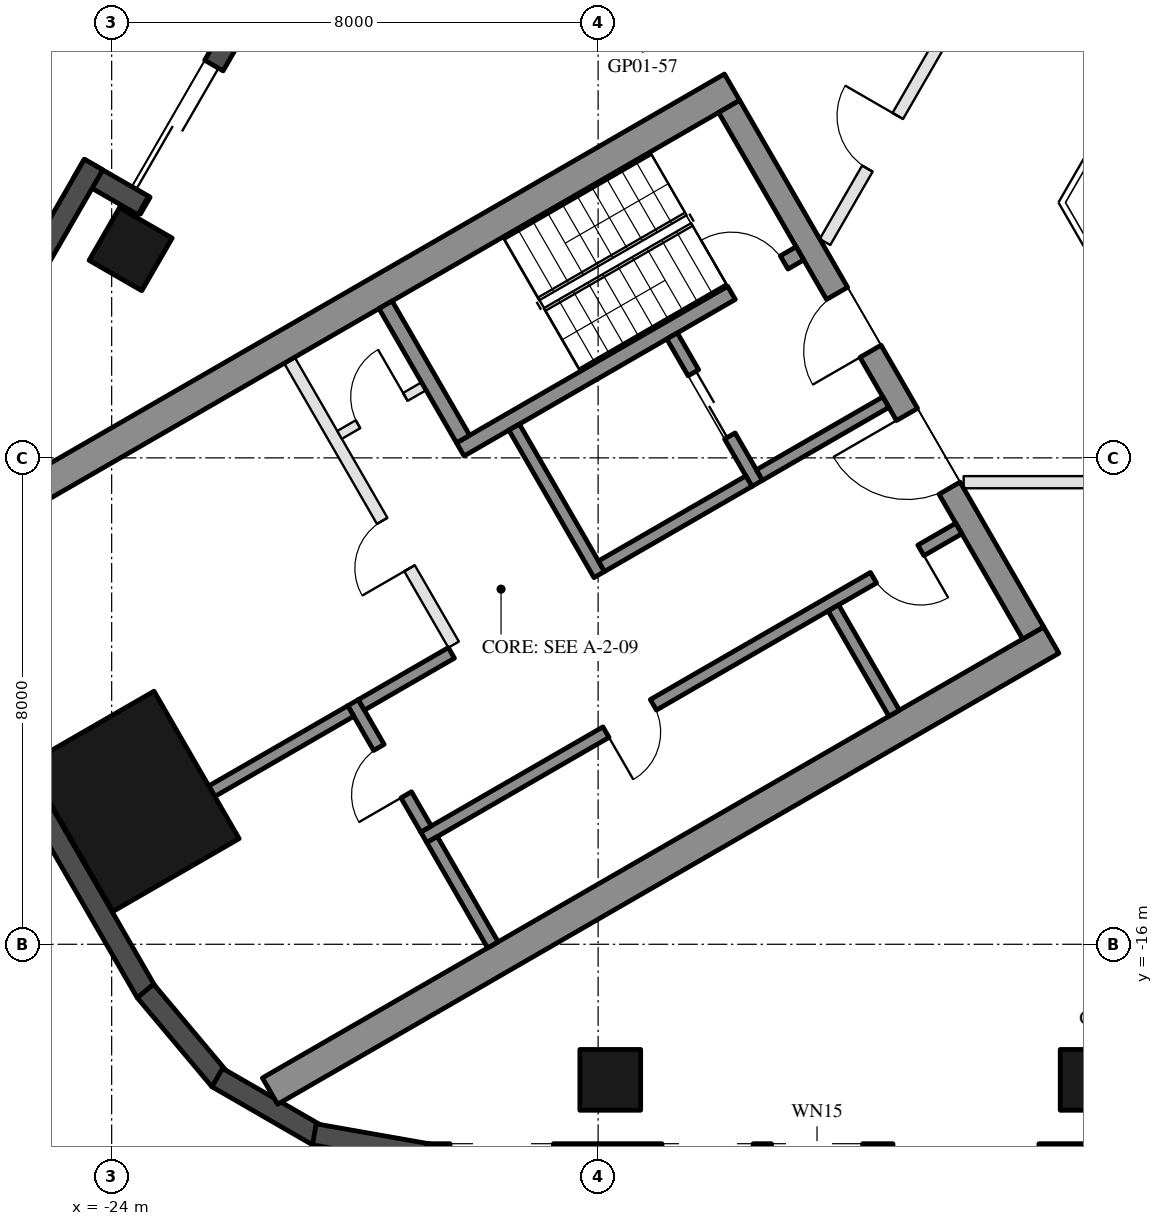
"""IFC4 building model, lengths in metres.
Left out: names, types, materials, properties, quantities, classifications, styles, units other than length and angle.
Written with IfcOpenShell. Run it as: python <this file> out.ifc"""

import sys

from ifc_helpers import new_model, si_unit, direction, frame, frame_2d, origin, origin_2d, place, context, subcontext, project, spatial, rectangle, hollow_rectangle, extrude, element, fill, save


model = new_model("IFC4")
c1 = context("Model", 3, precision=1e-05, world=origin(), true_north=direction((0.0, 1.0)))
c2 = subcontext(c1, "Body", "Model", "MODEL_VIEW")
j1 = project(units=[si_unit("LENGTHUNIT", "METRE"), si_unit("PLANEANGLEUNIT", "RADIAN")], contexts=[c1])
p1 = place(None, origin())
s1 = spatial("IfcSite", under=j1, at=p1, CompositionType="ELEMENT")
p2 = place(p1, origin())
s2 = spatial("IfcBuilding", under=s1, at=p2, CompositionType="ELEMENT")
p3 = place(p2, frame((0.0, 0.0, 46.5)))
s3 = spatial("IfcBuildingStorey", under=s2, at=p3, CompositionType="ELEMENT", Elevation=46.5)
for number, where, z_axis, x_axis in (
    (1, (-15.8, -18.23, 0.0), (0.0, 0.0, 1.0), (-1.0, 0.0, 0.0)),
    (2, (-7.9, -18.23, 0.0), (0.0, 0.0, 1.0), (-1.0, 0.0, 0.0)),
    (3, (-23.688, -4.568, 0.0), (0.0, 0.0, 1.0), (0.5, 0.866, 0.0)),
):
    element("IfcColumn", number, at=place(p3, frame(where, z_axis=z_axis, x_axis=x_axis)), inside=s3, PredefinedType="COLUMN", context=c2, shape_type="SweptSolid", body=[
        extrude(hollow_rectangle(XDim=1.0, YDim=1.0, WallThickness=0.045, at=origin_2d()), origin(), (0.0, 0.0, 1.0), 3.7),
    ])
p4 = place(p3, frame((-23.643, -13.65, 0.0), z_axis=(0.0, 0.0, 1.0), x_axis=(-0.5, 0.866025403784, 0.0)))
e4 = element("IfcColumn", 4, at=p4, inside=s3, PredefinedType="COLUMN", context=c2, shape_type="SweptSolid", body=[
    extrude(hollow_rectangle(XDim=2.8, YDim=2.4, WallThickness=0.07, at=origin_2d()), origin(), (0.0, 0.0, 1.0), 3.7),
])
p5 = place(p3, frame((-20.309, 1.934, 0.0), z_axis=(0.0, 0.0, 1.0), x_axis=(-0.499992114976, -0.866029956157, 0.0)))
e5 = element("IfcWall", 5, at=p5, inside=s3, PredefinedType="SOLIDWALL", context=c2, shape_type="SweptSolid", body=[
    extrude(rectangle(XDim=6.74, YDim=0.35, at=frame_2d((3.37, 0.0))), origin(), (0.0, 0.0, 1.0), 3.55),
])
p6 = place(p5, frame((4.02, 0.0, 0.0)))
e6 = element("IfcOpeningElement", 6, at=p6, cuts=e5, PredefinedType="OPENING", context=c2, shape_type="SweptSolid", body=[
    extrude(rectangle(XDim=2.4, YDim=2.4, at=frame_2d((1.2, 1.2))), frame((0.0, 0.185, 0.0), z_axis=(0.0, -1.0, 0.0), x_axis=(1.0, 0.0, 0.0)), (0.0, 0.0, 1.0), 0.37),
])
p7 = place(p5, frame((0.32, 0.0, 0.3)))
e7 = element("IfcOpeningElement", 7, at=p7, cuts=e5, PredefinedType="OPENING", context=c2, shape_type="SweptSolid", body=[
    extrude(rectangle(XDim=1.5, YDim=2.65, at=frame_2d((0.75, 1.325))), frame((0.0, 0.185, 0.0), z_axis=(0.0, -1.0, 0.0), x_axis=(1.0, 0.0, 0.0)), (0.0, 0.0, 1.0), 0.37),
])
p8 = place(p5, frame((2.12, 0.0, 0.3)))
e8 = element("IfcOpeningElement", 8, at=p8, cuts=e5, PredefinedType="OPENING", context=c2, shape_type="SweptSolid", body=[
    extrude(rectangle(XDim=1.5, YDim=2.65, at=frame_2d((0.75, 1.325))), frame((0.0, 0.185, 0.0), z_axis=(0.0, -1.0, 0.0), x_axis=(1.0, 0.0, 0.0)), (0.0, 0.0, 1.0), 0.37),
])
p9 = place(p3, frame((-23.481, -3.85, 0.0), z_axis=(0.0, 0.0, 1.0), x_axis=(-0.866092288191, 0.499884134912, 0.0)))
e9 = element("IfcWall", 9, at=p9, inside=s3, PredefinedType="SOLIDWALL", context=c2, shape_type="SweptSolid", body=[
    extrude(rectangle(XDim=1.22, YDim=0.35, at=frame_2d((0.61, 0.0))), origin(), (0.0, 0.0, 1.0), 3.55),
])
p10 = place(p3, frame((-24.299, -3.176, 0.0), z_axis=(0.0, 0.0, 1.0), x_axis=(-0.500028278809, -0.866009076391, 0.0)))
e10 = element("IfcWall", 10, at=p10, inside=s3, PredefinedType="SOLIDWALL", context=c2, shape_type="SweptSolid", body=[
    extrude(rectangle(XDim=3.916, YDim=0.35, at=frame_2d((1.958, 0.0))), origin(), (0.0, 0.0, 1.0), 3.55),
])
p11 = place(p10, frame((1.75, 0.0, 0.3)))
e11 = element("IfcOpeningElement", 11, at=p11, cuts=e10, PredefinedType="OPENING", context=c2, shape_type="SweptSolid", body=[
    extrude(rectangle(XDim=1.7, YDim=2.65, at=frame_2d((0.85, 1.325))), frame((0.0, 0.185, 0.0), z_axis=(0.0, -1.0, 0.0), x_axis=(1.0, 0.0, 0.0)), (0.0, 0.0, 1.0), 0.37),
])
p12 = place(p3, frame((-26.257, -11.893, 0.0), z_axis=(0.0, 0.0, 1.0), x_axis=(0.500018773155, -0.866014564827, 0.0)))
e12 = element("IfcWall", 12, at=p12, inside=s3, PredefinedType="SOLIDWALL", context=c2, shape_type="SweptSolid", body=[
    extrude(rectangle(XDim=5.658, YDim=0.35, at=frame_2d((2.829, 0.0))), origin(), (0.0, 0.0, 1.0), 3.55),
])
for number, where, z_axis, x_axis in (
    (13, (-23.445, -16.768, 0.0), (0.0, 0.0, 1.0), (0.643, -0.766, 0.0)),
    (14, (-22.264, -18.192, 0.0), (0.0, 0.0, 1.0), (0.866, -0.5, 0.0)),
):
    element("IfcWall", number, at=place(p3, frame(where, z_axis=z_axis, x_axis=x_axis)), inside=s3, PredefinedType="SOLIDWALL", context=c2, shape_type="SweptSolid", body=[
        extrude(rectangle(XDim=1.91, YDim=0.35, at=frame_2d((0.955, 0.0))), origin(), (0.0, 0.0, 1.0), 3.55),
    ])
p13 = place(p3, frame((-20.667, -19.126, 0.0), z_axis=(0.0, 0.0, 1.0), x_axis=(0.984798995425, -0.173697837091, 0.0)))
e15 = element("IfcWall", 15, at=p13, inside=s3, PredefinedType="SOLIDWALL", context=c2, shape_type="SweptSolid", body=[
    extrude(rectangle(XDim=1.91, YDim=0.35, at=frame_2d((0.955, 0.0))), origin(), (0.0, 0.0, 1.0), 3.55),
])
p14 = place(p3, frame((-18.816, -19.455, 0.0), z_axis=(0.0, 0.0, 1.0), x_axis=(1.0, 0.0, 0.0)))
e16 = element("IfcWall", 16, at=p14, inside=s3, PredefinedType="SOLIDWALL", context=c2, shape_type="SweptSolid", body=[
    extrude(rectangle(XDim=11.816, YDim=0.35, at=frame_2d((5.908, 0.0))), origin(), (0.0, 0.0, 1.0), 3.55),
])
p15 = place(p14, frame((0.381, 0.0, 0.3)))
e17 = element("IfcOpeningElement", 17, at=p15, cuts=e16, PredefinedType="OPENING", context=c2, shape_type="SweptSolid", body=[
    extrude(rectangle(XDim=1.7, YDim=2.65, at=frame_2d((0.85, 1.325))), frame((0.0, 0.185, 0.0), z_axis=(0.0, -1.0, 0.0), x_axis=(1.0, 0.0, 0.0)), (0.0, 0.0, 1.0), 0.37),
])
p16 = place(p14, frame((7.665, 0.0, 0.0)))
e18 = element("IfcOpeningElement", 18, at=p16, cuts=e16, PredefinedType="OPENING", context=c2, shape_type="SweptSolid", body=[
    extrude(rectangle(XDim=2.4, YDim=2.4, at=frame_2d((1.2, 1.2))), frame((0.0, 0.185, 0.0), z_axis=(0.0, -1.0, 0.0), x_axis=(1.0, 0.0, 0.0)), (0.0, 0.0, 1.0), 0.37),
])
p17 = place(p14, frame((3.866, 0.0, 0.3)))
e19 = element("IfcOpeningElement", 19, at=p17, cuts=e16, PredefinedType="OPENING", context=c2, shape_type="SweptSolid", body=[
    extrude(rectangle(XDim=1.5, YDim=2.65, at=frame_2d((0.75, 1.325))), frame((0.0, 0.185, 0.0), z_axis=(0.0, -1.0, 0.0), x_axis=(1.0, 0.0, 0.0)), (0.0, 0.0, 1.0), 0.37),
])
p18 = place(p14, frame((5.666, 0.0, 0.3)))
e20 = element("IfcOpeningElement", 20, at=p18, cuts=e16, PredefinedType="OPENING", context=c2, shape_type="SweptSolid", body=[
    extrude(rectangle(XDim=1.5, YDim=2.65, at=frame_2d((0.75, 1.325))), frame((0.0, 0.185, 0.0), z_axis=(0.0, -1.0, 0.0), x_axis=(1.0, 0.0, 0.0)), (0.0, 0.0, 1.0), 0.37),
])
for number, where, z_axis, x_axis in (
    (21, (-13.797, -1.903, 0.0), (0.0, 0.0, 1.0), (-0.866, -0.5, 0.0)),
    (22, (-8.547, -10.997, 0.0), (0.0, 0.0, 1.0), (-0.866, -0.5, 0.0)),
):
    element("IfcWall", number, at=place(p3, frame(where, z_axis=z_axis, x_axis=x_axis)), inside=s3, PredefinedType="SHEAR", context=c2, shape_type="SweptSolid", body=[
        extrude(rectangle(XDim=14.837, YDim=0.5, at=frame_2d((7.418, 0.0))), origin(), (0.0, 0.0, 1.0), 3.5),
    ])
p19 = place(p3, frame((-13.845, -2.22, 0.0), z_axis=(0.0, 0.0, 1.0), x_axis=(0.500004234368, -0.866022959057, 0.0)))
e23 = element("IfcWall", 23, at=p19, inside=s3, PredefinedType="SHEAR", context=c2, shape_type="SweptSolid", body=[
    extrude(rectangle(XDim=10.0, YDim=0.4, at=frame_2d((5.0, 0.0))), origin(), (0.0, 0.0, 1.0), 3.5),
])
p20 = place(p19, frame((3.55, 0.0, 0.0)))
e24 = element("IfcOpeningElement", 24, at=p20, cuts=e23, PredefinedType="OPENING", context=c2, shape_type="SweptSolid", body=[
    extrude(rectangle(XDim=1.1, YDim=2.1, at=frame_2d((0.55, 1.05))), frame((0.0, 0.21, 0.0), z_axis=(0.0, -1.0, 0.0), x_axis=(1.0, 0.0, 0.0)), (0.0, 0.0, 1.0), 0.42),
])
p21 = place(p19, frame((5.85, 0.0, 0.0)))
e25 = element("IfcOpeningElement", 25, at=p21, cuts=e23, PredefinedType="OPENING", context=c2, shape_type="SweptSolid", body=[
    extrude(rectangle(XDim=1.4, YDim=2.1, at=frame_2d((0.7, 1.05))), frame((0.0, 0.21, 0.0), z_axis=(0.0, -1.0, 0.0), x_axis=(1.0, 0.0, 0.0)), (0.0, 0.0, 1.0), 0.42),
])
p22 = place(p3, frame((-12.681, -4.636, 0.0), z_axis=(0.0, 0.0, 1.0), x_axis=(-0.866021702275, -0.500006411147, 0.0)))
e26 = element("IfcWall", 26, at=p22, inside=s3, PredefinedType="SHEAR", context=c2, shape_type="SweptSolid", body=[
    extrude(rectangle(XDim=6.45, YDim=0.25, at=frame_2d((3.225, 0.0))), origin(), (0.0, 0.0, 1.0), 3.5),
])
p23 = place(p22, frame((0.3, 0.0, 0.0)))
e27 = element("IfcOpeningElement", 27, at=p23, cuts=e26, PredefinedType="OPENING", context=c2, shape_type="SweptSolid", body=[
    extrude(rectangle(XDim=1.0, YDim=2.1, at=frame_2d((0.5, 1.05))), frame((0.0, 0.135, 0.0), z_axis=(0.0, -1.0, 0.0), x_axis=(1.0, 0.0, 0.0)), (0.0, 0.0, 1.0), 0.27),
])
p24 = place(p3, frame((-19.496, -5.482, 0.0), z_axis=(0.0, 0.0, 1.0), x_axis=(0.499990435942, -0.866030925526, 0.0)))
e28 = element("IfcWall", 28, at=p24, inside=s3, PredefinedType="SHEAR", context=c2, shape_type="SweptSolid", body=[
    extrude(rectangle(XDim=2.55, YDim=0.25, at=frame_2d((1.275, 0.0))), origin(), (0.0, 0.0, 1.0), 3.5),
])
p25 = place(p3, frame((-17.381, -7.495, 0.0), z_axis=(0.0, 0.0, 1.0), x_axis=(0.500011755427, -0.866018616679, 0.0)))
e29 = element("IfcWall", 29, at=p25, inside=s3, PredefinedType="SHEAR", context=c2, shape_type="SweptSolid", body=[
    extrude(rectangle(XDim=2.8, YDim=0.2, at=frame_2d((1.4, 0.0))), origin(), (0.0, 0.0, 1.0), 3.5),
])
p26 = place(p3, frame((-14.783, -5.995, 0.0), z_axis=(0.0, 0.0, 1.0), x_axis=(0.49994636267, -0.866056369097, 0.0)))
e30 = element("IfcWall", 30, at=p26, inside=s3, PredefinedType="SHEAR", context=c2, shape_type="SweptSolid", body=[
    extrude(rectangle(XDim=2.8, YDim=0.2, at=frame_2d((1.4, 0.0))), origin(), (0.0, 0.0, 1.0), 3.5),
])
p27 = place(p26, frame((0.7, 0.0, 0.0)))
e31 = element("IfcOpeningElement", 31, at=p27, cuts=e30, PredefinedType="OPENING", context=c2, shape_type="SweptSolid", body=[
    extrude(rectangle(XDim=1.2, YDim=2.1, at=frame_2d((0.6, 1.05))), frame((0.0, 0.11, 0.0), z_axis=(0.0, -1.0, 0.0), x_axis=(1.0, 0.0, 0.0)), (0.0, 0.0, 1.0), 0.22),
])
p28 = place(p3, frame((-13.52, -8.383, 0.0), z_axis=(0.0, 0.0, 1.0), x_axis=(-0.866034573852, -0.49998411664, 0.0)))
e32 = element("IfcWall", 32, at=p28, inside=s3, PredefinedType="SHEAR", context=c2, shape_type="SweptSolid", body=[
    extrude(rectangle(XDim=2.8, YDim=0.2, at=frame_2d((1.4, 0.0))), origin(), (0.0, 0.0, 1.0), 3.5),
])
p29 = place(p3, frame((-11.268, -7.083, 0.0), z_axis=(0.0, 0.0, 1.0), x_axis=(-0.866050077142, -0.499957262057, 0.0)))
e33 = element("IfcWall", 33, at=p29, inside=s3, PredefinedType="SHEAR", context=c2, shape_type="SweptSolid", body=[
    extrude(rectangle(XDim=2.4, YDim=0.2, at=frame_2d((1.2, 0.0))), origin(), (0.0, 0.0, 1.0), 3.5),
])
p30 = place(p3, frame((-10.068, -9.162, 0.0), z_axis=(0.0, 0.0, 1.0), x_axis=(-0.866032725843, -0.499987317609, 0.0)))
e34 = element("IfcWall", 34, at=p30, inside=s3, PredefinedType="SHEAR", context=c2, shape_type="SweptSolid", body=[
    extrude(rectangle(XDim=10.16, YDim=0.2, at=frame_2d((5.08, 0.0))), origin(), (0.0, 0.0, 1.0), 3.5),
])
p31 = place(p30, frame((0.72, 0.0, 0.0)))
e35 = element("IfcOpeningElement", 35, at=p31, cuts=e34, PredefinedType="OPENING", context=c2, shape_type="SweptSolid", body=[
    extrude(rectangle(XDim=0.9, YDim=2.1, at=frame_2d((0.45, 1.05))), frame((0.0, 0.11, 0.0), z_axis=(0.0, -1.0, 0.0), x_axis=(1.0, 0.0, 0.0)), (0.0, 0.0, 1.0), 0.22),
])
p32 = place(p30, frame((5.8, 0.0, 0.0)))
e36 = element("IfcOpeningElement", 36, at=p32, cuts=e34, PredefinedType="OPENING", context=c2, shape_type="SweptSolid", body=[
    extrude(rectangle(XDim=0.9, YDim=2.1, at=frame_2d((0.45, 1.05))), frame((0.0, 0.11, 0.0), z_axis=(0.0, -1.0, 0.0), x_axis=(1.0, 0.0, 0.0)), (0.0, 0.0, 1.0), 0.22),
])
p33 = place(p3, frame((-20.031, -12.026, 0.0), z_axis=(0.0, 0.0, 1.0), x_axis=(0.500033551112, -0.866006032174, 0.0)))
e37 = element("IfcWall", 37, at=p33, inside=s3, PredefinedType="SHEAR", context=c2, shape_type="SweptSolid", body=[
    extrude(rectangle(XDim=2.4, YDim=0.2, at=frame_2d((1.2, 0.0))), origin(), (0.0, 0.0, 1.0), 3.5),
])
p34 = place(p33, frame((0.85, 0.0, 0.0)))
e38 = element("IfcOpeningElement", 38, at=p34, cuts=e37, PredefinedType="OPENING", context=c2, shape_type="SweptSolid", body=[
    extrude(rectangle(XDim=0.9, YDim=2.1, at=frame_2d((0.45, 1.05))), frame((0.0, 0.11, 0.0), z_axis=(0.0, -1.0, 0.0), x_axis=(1.0, 0.0, 0.0)), (0.0, 0.0, 1.0), 0.22),
])
p35 = place(p3, frame((-18.413, -11.208, 0.0), z_axis=(0.0, 0.0, 1.0), x_axis=(-0.866038183914, -0.499977863513, 0.0)))
e39 = element("IfcWall", 39, at=p35, inside=s3, PredefinedType="SHEAR", context=c2, shape_type="SweptSolid", body=[
    extrude(rectangle(XDim=1.71, YDim=0.2, at=frame_2d((0.855, 0.0))), origin(), (0.0, 0.0, 1.0), 3.5),
])
for number, where, z_axis, x_axis in (
    (40, (-12.131, -10.468, 0.0), (0.0, 0.0, 1.0), (0.5, -0.866, 0.0)),
    (41, (-18.73, -14.278, 0.0), (0.0, 0.0, 1.0), (0.5, -0.866, 0.0)),
):
    element("IfcWall", number, at=place(p3, frame(where, z_axis=z_axis, x_axis=x_axis)), inside=s3, PredefinedType="SHEAR", context=c2, shape_type="SweptSolid", body=[
        extrude(rectangle(XDim=2.0, YDim=0.2, at=frame_2d((1.0, 0.0))), origin(), (0.0, 0.0, 1.0), 3.5),
    ])
p36 = place(p3, frame((-20.067, -12.163, 0.0), z_axis=(0.0, 0.0, 1.0), x_axis=(-0.866060851709, -0.499938597367, 0.0)))
e42 = element("IfcWall", 42, at=p36, inside=s3, PredefinedType="SHEAR", context=c2, shape_type="SweptSolid", body=[
    extrude(rectangle(XDim=2.64, YDim=0.2, at=frame_2d((1.32, 0.0))), origin(), (0.0, 0.0, 1.0), 3.5),
])
p37 = place(p3, frame((-21.076, -6.395, 0.0), z_axis=(0.0, 0.0, 1.0), x_axis=(0.50001468107, -0.866016927499, 0.0)))
e43 = element("IfcWall", 43, at=p37, inside=s3, PredefinedType="PARTITIONING", context=c2, shape_type="SweptSolid", body=[
    extrude(rectangle(XDim=5.4, YDim=0.2, at=frame_2d((2.7, 0.0))), origin(), (0.0, 0.0, 1.0), 3.5),
])
p38 = place(p37, frame((3.05, 0.0, 0.0)))
e44 = element("IfcOpeningElement", 44, at=p38, cuts=e43, PredefinedType="OPENING", context=c2, shape_type="SweptSolid", body=[
    extrude(rectangle(XDim=0.9, YDim=2.1, at=frame_2d((0.45, 1.05))), frame((0.0, 0.11, 0.0), z_axis=(0.0, -1.0, 0.0), x_axis=(1.0, 0.0, 0.0)), (0.0, 0.0, 1.0), 0.22),
])
p39 = place(p3, frame((-18.866, -6.822, 0.0), z_axis=(0.0, 0.0, 1.0), x_axis=(-0.866028054938, -0.499995408039, 0.0)))
e45 = element("IfcWall", 45, at=p39, inside=s3, PredefinedType="PARTITIONING", context=c2, shape_type="SweptSolid", body=[
    extrude(rectangle(XDim=1.6, YDim=0.15, at=frame_2d((0.8, 0.0))), origin(), (0.0, 0.0, 1.0), 3.5),
])
p40 = place(p39, frame((0.35, 0.0, 0.0)))
e46 = element("IfcOpeningElement", 46, at=p40, cuts=e45, PredefinedType="OPENING", context=c2, shape_type="SweptSolid", body=[
    extrude(rectangle(XDim=0.9, YDim=2.1, at=frame_2d((0.45, 1.05))), frame((0.0, 0.085, 0.0), z_axis=(0.0, -1.0, 0.0), x_axis=(1.0, 0.0, 0.0)), (0.0, 0.0, 1.0), 0.17),
])
p41 = place(p3, frame((-3.4, -8.4, 0.0), z_axis=(0.0, 0.0, 1.0), x_axis=(-1.0, 0.0, 0.0)))
e47 = element("IfcWall", 47, at=p41, inside=s3, PredefinedType="PARTITIONING", context=c2, shape_type="SweptSolid", body=[
    extrude(rectangle(XDim=6.588, YDim=0.2, at=frame_2d((3.294, 0.0))), origin(), (0.0, 0.0, 1.0), 2.95),
])
p42 = place(p41, frame((2.794, 0.0, 0.0)))
e48 = element("IfcOpeningElement", 48, at=p42, cuts=e47, PredefinedType="OPENING", context=c2, shape_type="SweptSolid", body=[
    extrude(rectangle(XDim=1.0, YDim=2.1, at=frame_2d((0.5, 1.05))), frame((0.0, 0.11, 0.0), z_axis=(0.0, -1.0, 0.0), x_axis=(1.0, 0.0, 0.0)), (0.0, 0.0, 1.0), 0.22),
])
p43 = place(p3, frame((-12.269, -4.45, 0.0), z_axis=(0.0, 0.0, 1.0), x_axis=(0.500055316652, 0.865993464345, 0.0)))
e49 = element("IfcWall", 49, at=p43, inside=s3, PredefinedType="PARTITIONING", context=c2, shape_type="SweptSolid", body=[
    extrude(rectangle(XDim=3.788, YDim=0.2, at=frame_2d((1.894, 0.0))), origin(), (0.0, 0.0, 1.0), 2.95),
])
p44 = place(p43, frame((1.394, 0.0, 0.0)))
e50 = element("IfcOpeningElement", 50, at=p44, cuts=e49, PredefinedType="OPENING", context=c2, shape_type="SweptSolid", body=[
    extrude(rectangle(XDim=1.0, YDim=2.1, at=frame_2d((0.5, 1.05))), frame((0.0, 0.11, 0.0), z_axis=(0.0, -1.0, 0.0), x_axis=(1.0, 0.0, 0.0)), (0.0, 0.0, 1.0), 0.22),
])
p45 = place(p6, frame((2.4, 0.0, 0.0), z_axis=(0.0, 0.0, 1.0), x_axis=(-1.0, 0.0, 0.0)))
e51 = element("IfcDoor", 51, at=p45, inside=s3, OperationType="SLIDING_TO_LEFT", PredefinedType="DOOR", context=c2, shape_type="SweptSolid", body=[
    extrude(rectangle(XDim=2.4, YDim=2.4, at=frame_2d((1.2, 1.2))), frame((0.0, 0.025, 0.0), z_axis=(0.0, -1.0, 0.0), x_axis=(1.0, 0.0, 0.0)), (0.0, 0.0, 1.0), 0.05),
])
fill(e6, e51)
p46 = place(p27, origin())
e52 = element("IfcDoor", 52, at=p46, inside=s3, OperationType="DOUBLE_DOOR_SLIDING", PredefinedType="DOOR", context=c2, shape_type="SweptSolid", body=[
    extrude(rectangle(XDim=1.2, YDim=2.1, at=frame_2d((0.6, 1.05))), frame((0.0, 0.025, 0.0), z_axis=(0.0, -1.0, 0.0), x_axis=(1.0, 0.0, 0.0)), (0.0, 0.0, 1.0), 0.05),
])
fill(e31, e52)
p47 = place(p40, frame((0.9, 0.0, 0.0), z_axis=(0.0, 0.0, 1.0), x_axis=(-1.0, 0.0, 0.0)))
e53 = element("IfcDoor", 53, at=p47, inside=s3, OperationType="SINGLE_SWING_RIGHT", PredefinedType="DOOR", context=c2, shape_type="SweptSolid", body=[
    extrude(rectangle(XDim=0.9, YDim=2.1, at=frame_2d((0.45, 1.05))), frame((0.0, 0.025, 0.0), z_axis=(0.0, -1.0, 0.0), x_axis=(1.0, 0.0, 0.0)), (0.0, 0.0, 1.0), 0.05),
])
fill(e46, e53)
p48 = place(p31, origin())
e54 = element("IfcDoor", 54, at=p48, inside=s3, OperationType="SINGLE_SWING_LEFT", PredefinedType="DOOR", context=c2, shape_type="SweptSolid", body=[
    extrude(rectangle(XDim=0.9, YDim=2.1, at=frame_2d((0.45, 1.05))), frame((0.0, 0.025, 0.0), z_axis=(0.0, -1.0, 0.0), x_axis=(1.0, 0.0, 0.0)), (0.0, 0.0, 1.0), 0.05),
])
fill(e35, e54)
p49 = place(p32, origin())
e55 = element("IfcDoor", 55, at=p49, inside=s3, OperationType="SINGLE_SWING_RIGHT", PredefinedType="DOOR", context=c2, shape_type="SweptSolid", body=[
    extrude(rectangle(XDim=0.9, YDim=2.1, at=frame_2d((0.45, 1.05))), frame((0.0, 0.025, 0.0), z_axis=(0.0, -1.0, 0.0), x_axis=(1.0, 0.0, 0.0)), (0.0, 0.0, 1.0), 0.05),
])
fill(e36, e55)
p50 = place(p34, frame((0.9, 0.0, 0.0), z_axis=(0.0, 0.0, 1.0), x_axis=(-1.0, 0.0, 0.0)))
e56 = element("IfcDoor", 56, at=p50, inside=s3, OperationType="SINGLE_SWING_LEFT", PredefinedType="DOOR", context=c2, shape_type="SweptSolid", body=[
    extrude(rectangle(XDim=0.9, YDim=2.1, at=frame_2d((0.45, 1.05))), frame((0.0, 0.025, 0.0), z_axis=(0.0, -1.0, 0.0), x_axis=(1.0, 0.0, 0.0)), (0.0, 0.0, 1.0), 0.05),
])
fill(e38, e56)
p51 = place(p38, frame((0.9, 0.0, 0.0), z_axis=(0.0, 0.0, 1.0), x_axis=(-1.0, 0.0, 0.0)))
e57 = element("IfcDoor", 57, at=p51, inside=s3, OperationType="SINGLE_SWING_LEFT", PredefinedType="DOOR", context=c2, shape_type="SweptSolid", body=[
    extrude(rectangle(XDim=0.9, YDim=2.1, at=frame_2d((0.45, 1.05))), frame((0.0, 0.025, 0.0), z_axis=(0.0, -1.0, 0.0), x_axis=(1.0, 0.0, 0.0)), (0.0, 0.0, 1.0), 0.05),
])
fill(e44, e57)
p52 = place(p20, frame((1.1, 0.0, 0.0), z_axis=(0.0, 0.0, 1.0), x_axis=(-1.0, 0.0, 0.0)))
e58 = element("IfcDoor", 58, at=p52, inside=s3, OperationType="SINGLE_SWING_LEFT", PredefinedType="DOOR", context=c2, shape_type="SweptSolid", body=[
    extrude(rectangle(XDim=1.1, YDim=2.1, at=frame_2d((0.55, 1.05))), frame((0.0, 0.025, 0.0), z_axis=(0.0, -1.0, 0.0), x_axis=(1.0, 0.0, 0.0)), (0.0, 0.0, 1.0), 0.05),
])
fill(e24, e58)
p53 = place(p21, frame((1.4, 0.0, 0.0), z_axis=(0.0, 0.0, 1.0), x_axis=(-1.0, 0.0, 0.0)))
e59 = element("IfcDoor", 59, at=p53, inside=s3, OperationType="DOUBLE_DOOR_SINGLE_SWING", PredefinedType="DOOR", context=c2, shape_type="SweptSolid", body=[
    extrude(rectangle(XDim=1.4, YDim=2.1, at=frame_2d((0.7, 1.05))), frame((0.0, 0.025, 0.0), z_axis=(0.0, -1.0, 0.0), x_axis=(1.0, 0.0, 0.0)), (0.0, 0.0, 1.0), 0.05),
])
fill(e25, e59)
p54 = place(p23, frame((1.0, 0.0, 0.0), z_axis=(0.0, 0.0, 1.0), x_axis=(-1.0, 0.0, 0.0)))
e60 = element("IfcDoor", 60, at=p54, inside=s3, OperationType="SINGLE_SWING_LEFT", PredefinedType="DOOR", context=c2, shape_type="SweptSolid", body=[
    extrude(rectangle(XDim=1.0, YDim=2.1, at=frame_2d((0.5, 1.05))), frame((0.0, 0.025, 0.0), z_axis=(0.0, -1.0, 0.0), x_axis=(1.0, 0.0, 0.0)), (0.0, 0.0, 1.0), 0.05),
])
fill(e27, e60)
p55 = place(p44, origin())
e61 = element("IfcDoor", 61, at=p55, inside=s3, OperationType="SINGLE_SWING_RIGHT", PredefinedType="DOOR", context=c2, shape_type="SweptSolid", body=[
    extrude(rectangle(XDim=1.0, YDim=2.1, at=frame_2d((0.5, 1.05))), frame((0.0, 0.025, 0.0), z_axis=(0.0, -1.0, 0.0), x_axis=(1.0, 0.0, 0.0)), (0.0, 0.0, 1.0), 0.05),
])
fill(e50, e61)
save(model, sys.argv[1])
